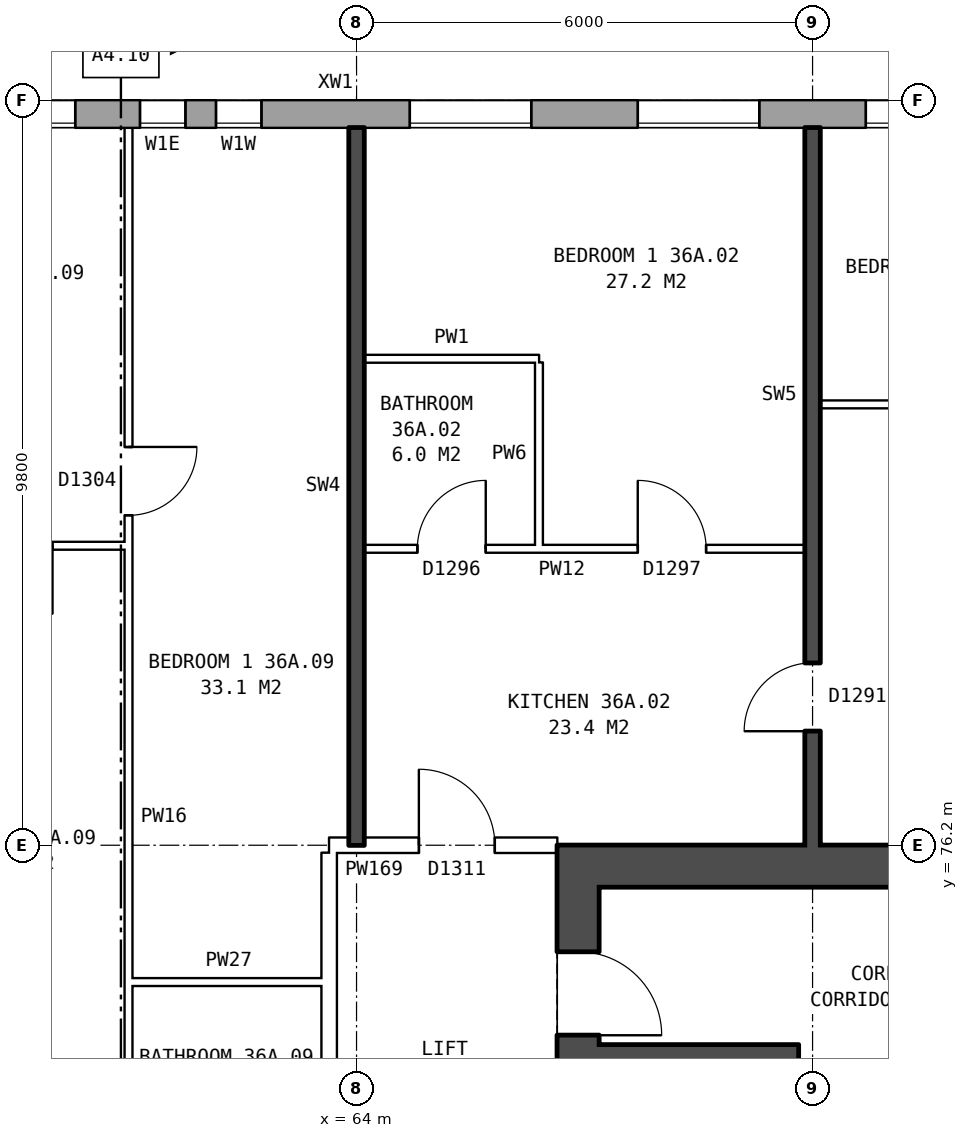
"""IFC4 building model, lengths in metres.
Left out: names, types, materials, properties, quantities, classifications, styles, units other than length and angle.
Written with IfcOpenShell. Run it as: python <this file> out.ifc"""

import sys

from ifc_helpers import new_model, si_unit, direction, frame, frame_2d, origin, place, context, subcontext, project, spatial, rectangle, extrude, element, fill, save


model = new_model("IFC4")
c1 = context("Model", 3, precision=1e-05, world=origin(), true_north=direction((0.0, 1.0)))
c2 = subcontext(c1, "Body", "Model", "MODEL_VIEW")
j1 = project(units=[si_unit("LENGTHUNIT", "METRE"), si_unit("PLANEANGLEUNIT", "RADIAN")], contexts=[c1])
p1 = place(None, origin())
s1 = spatial("IfcSite", under=j1, at=p1, CompositionType="ELEMENT")
p2 = place(p1, origin())
s2 = spatial("IfcBuilding", under=s1, at=p2, CompositionType="ELEMENT")
p3 = place(p2, frame((0.0, 0.0, 129.9)))
s3 = spatial("IfcBuildingStorey", under=s2, at=p3, CompositionType="ELEMENT", Elevation=129.9)
p4 = place(p3, frame((72.925, 85.82, 0.0), z_axis=(0.0, 0.0, 1.0), x_axis=(-1.0, 0.0, 0.0)))
e1 = element("IfcWall", 1, at=p4, inside=s3, PredefinedType="STANDARD", context=c2, shape_type="SweptSolid", body=[
    extrude(rectangle(XDim=43.101, YDim=0.36, at=frame_2d((21.55, 0.0))), origin(), (0.0, 0.0, 1.0), 2.85),
])
p5 = place(p4, frame((0.625, 0.0, 0.8)))
e2 = element("IfcOpeningElement", 2, at=p5, cuts=e1, PredefinedType="OPENING", context=c2, shape_type="SweptSolid", body=[
    extrude(rectangle(XDim=1.6, YDim=1.8, at=frame_2d((0.8, 0.9))), frame((0.0, 0.19, 0.0), z_axis=(0.0, -1.0, 0.0), x_axis=(1.0, 0.0, 0.0)), (0.0, 0.0, 1.0), 0.38),
])
p6 = place(p4, frame((3.625, 0.0, 0.8)))
e3 = element("IfcOpeningElement", 3, at=p6, cuts=e1, PredefinedType="OPENING", context=c2, shape_type="SweptSolid", body=[
    extrude(rectangle(XDim=1.6, YDim=1.8, at=frame_2d((0.8, 0.9))), frame((0.0, 0.19, 0.0), z_axis=(0.0, -1.0, 0.0), x_axis=(1.0, 0.0, 0.0)), (0.0, 0.0, 1.0), 0.38),
])
p7 = place(p4, frame((6.625, 0.0, 0.8)))
e4 = element("IfcOpeningElement", 4, at=p7, cuts=e1, PredefinedType="OPENING", context=c2, shape_type="SweptSolid", body=[
    extrude(rectangle(XDim=1.6, YDim=1.8, at=frame_2d((0.8, 0.9))), frame((0.0, 0.19, 0.0), z_axis=(0.0, -1.0, 0.0), x_axis=(1.0, 0.0, 0.0)), (0.0, 0.0, 1.0), 0.38),
])
p8 = place(p4, frame((10.175, 0.0, 0.15)))
e5 = element("IfcOpeningElement", 5, at=p8, cuts=e1, PredefinedType="OPENING", context=c2, shape_type="SweptSolid", body=[
    extrude(rectangle(XDim=0.6, YDim=0.9, at=frame_2d((0.3, 0.45))), frame((0.0, 0.19, 0.0), z_axis=(0.0, -1.0, 0.0), x_axis=(1.0, 0.0, 0.0)), (0.0, 0.0, 1.0), 0.38),
])
p9 = place(p4, frame((12.625, 0.0, 0.8)))
e6 = element("IfcOpeningElement", 6, at=p9, cuts=e1, PredefinedType="OPENING", context=c2, shape_type="SweptSolid", body=[
    extrude(rectangle(XDim=1.6, YDim=1.8, at=frame_2d((0.8, 0.9))), frame((0.0, 0.19, 0.0), z_axis=(0.0, -1.0, 0.0), x_axis=(1.0, 0.0, 0.0)), (0.0, 0.0, 1.0), 0.38),
])
p10 = place(p4, frame((15.625, 0.0, 0.8)))
e7 = element("IfcOpeningElement", 7, at=p10, cuts=e1, PredefinedType="OPENING", context=c2, shape_type="SweptSolid", body=[
    extrude(rectangle(XDim=1.6, YDim=1.8, at=frame_2d((0.8, 0.9))), frame((0.0, 0.19, 0.0), z_axis=(0.0, -1.0, 0.0), x_axis=(1.0, 0.0, 0.0)), (0.0, 0.0, 1.0), 0.38),
])
p11 = place(p4, frame((18.625, 0.0, 0.8)))
e8 = element("IfcOpeningElement", 8, at=p11, cuts=e1, PredefinedType="OPENING", context=c2, shape_type="SweptSolid", body=[
    extrude(rectangle(XDim=1.6, YDim=1.8, at=frame_2d((0.8, 0.9))), frame((0.0, 0.19, 0.0), z_axis=(0.0, -1.0, 0.0), x_axis=(1.0, 0.0, 0.0)), (0.0, 0.0, 1.0), 0.38),
])
p12 = place(p4, frame((21.625, 0.0, 0.8)))
e9 = element("IfcOpeningElement", 9, at=p12, cuts=e1, PredefinedType="OPENING", context=c2, shape_type="SweptSolid", body=[
    extrude(rectangle(XDim=1.6, YDim=1.8, at=frame_2d((0.8, 0.9))), frame((0.0, 0.19, 0.0), z_axis=(0.0, -1.0, 0.0), x_axis=(1.0, 0.0, 0.0)), (0.0, 0.0, 1.0), 0.38),
])
p13 = place(p4, frame((24.625, 0.0, 0.8)))
e10 = element("IfcOpeningElement", 10, at=p13, cuts=e1, PredefinedType="OPENING", context=c2, shape_type="SweptSolid", body=[
    extrude(rectangle(XDim=1.6, YDim=1.8, at=frame_2d((0.8, 0.9))), frame((0.0, 0.19, 0.0), z_axis=(0.0, -1.0, 0.0), x_axis=(1.0, 0.0, 0.0)), (0.0, 0.0, 1.0), 0.38),
])
p14 = place(p4, frame((27.625, 0.0, 0.8)))
e11 = element("IfcOpeningElement", 11, at=p14, cuts=e1, PredefinedType="OPENING", context=c2, shape_type="SweptSolid", body=[
    extrude(rectangle(XDim=1.6, YDim=1.8, at=frame_2d((0.8, 0.9))), frame((0.0, 0.19, 0.0), z_axis=(0.0, -1.0, 0.0), x_axis=(1.0, 0.0, 0.0)), (0.0, 0.0, 1.0), 0.38),
])
p15 = place(p4, frame((29.525, 0.0, 0.8)))
e12 = element("IfcOpeningElement", 12, at=p15, cuts=e1, PredefinedType="OPENING", context=c2, shape_type="SweptSolid", body=[
    extrude(rectangle(XDim=1.6, YDim=1.8, at=frame_2d((0.8, 0.9))), frame((0.0, 0.19, 0.0), z_axis=(0.0, -1.0, 0.0), x_axis=(1.0, 0.0, 0.0)), (0.0, 0.0, 1.0), 0.38),
])
p16 = place(p4, frame((33.375, 0.0, 1.7)))
e13 = element("IfcOpeningElement", 13, at=p16, cuts=e1, PredefinedType="OPENING", context=c2, shape_type="SweptSolid", body=[
    extrude(rectangle(XDim=0.8, YDim=0.9, at=frame_2d((0.4, 0.45))), frame((0.0, 0.19, 0.0), z_axis=(0.0, -1.0, 0.0), x_axis=(1.0, 0.0, 0.0)), (0.0, 0.0, 1.0), 0.38),
])
p17 = place(p4, frame((36.625, 0.0, 0.8)))
e14 = element("IfcOpeningElement", 14, at=p17, cuts=e1, PredefinedType="OPENING", context=c2, shape_type="SweptSolid", body=[
    extrude(rectangle(XDim=1.6, YDim=1.8, at=frame_2d((0.8, 0.9))), frame((0.0, 0.19, 0.0), z_axis=(0.0, -1.0, 0.0), x_axis=(1.0, 0.0, 0.0)), (0.0, 0.0, 1.0), 0.38),
])
p18 = place(p4, frame((39.625, 0.0, 0.8)))
e15 = element("IfcOpeningElement", 15, at=p18, cuts=e1, PredefinedType="OPENING", context=c2, shape_type="SweptSolid", body=[
    extrude(rectangle(XDim=1.6, YDim=1.8, at=frame_2d((0.8, 0.9))), frame((0.0, 0.19, 0.0), z_axis=(0.0, -1.0, 0.0), x_axis=(1.0, 0.0, 0.0)), (0.0, 0.0, 1.0), 0.38),
])
p19 = place(p4, frame((11.175, 0.0, 0.15)))
e16 = element("IfcOpeningElement", 16, at=p19, cuts=e1, PredefinedType="OPENING", context=c2, shape_type="SweptSolid", body=[
    extrude(rectangle(XDim=0.6, YDim=1.8, at=frame_2d((0.3, 0.9))), frame((0.0, 0.19, 0.0), z_axis=(0.0, -1.0, 0.0), x_axis=(1.0, 0.0, 0.0)), (0.0, 0.0, 1.0), 0.38),
])
p20 = place(p4, frame((31.425, 0.0, 0.8)))
e17 = element("IfcOpeningElement", 17, at=p20, cuts=e1, PredefinedType="OPENING", context=c2, shape_type="SweptSolid", body=[
    extrude(rectangle(XDim=0.8, YDim=0.9, at=frame_2d((0.4, 0.45))), frame((0.0, 0.19, 0.0), z_axis=(0.0, -1.0, 0.0), x_axis=(1.0, 0.0, 0.0)), (0.0, 0.0, 1.0), 0.38),
])
p21 = place(p4, frame((34.475, 0.0, 0.8)))
e18 = element("IfcOpeningElement", 18, at=p21, cuts=e1, PredefinedType="OPENING", context=c2, shape_type="SweptSolid", body=[
    extrude(rectangle(XDim=1.6, YDim=1.8, at=frame_2d((0.8, 0.9))), frame((0.0, 0.19, 0.0), z_axis=(0.0, -1.0, 0.0), x_axis=(1.0, 0.0, 0.0)), (0.0, 0.0, 1.0), 0.38),
])
p22 = place(p3, frame((66.915, 63.8, 0.0), z_axis=(0.0, 0.0, 1.0), x_axis=(0.0, 1.0, 0.0)))
e19 = element("IfcWall", 19, at=p22, inside=s3, PredefinedType="SHEAR", context=c2, shape_type="SweptSolid", body=[
    extrude(rectangle(XDim=12.4, YDim=0.55, at=frame_2d((6.2, 0.0))), origin(), (0.0, 0.0, 1.0), 2.85),
])
p23 = place(p22, frame((1.325, 0.0, 0.0)))
e20 = element("IfcOpeningElement", 20, at=p23, cuts=e19, PredefinedType="OPENING", context=c2, shape_type="SweptSolid", body=[
    extrude(rectangle(XDim=1.1, YDim=2.1, at=frame_2d((0.55, 1.05))), frame((0.0, 0.285, 0.0), z_axis=(0.0, -1.0, 0.0), x_axis=(1.0, 0.0, 0.0)), (0.0, 0.0, 1.0), 0.57),
])
p24 = place(p22, frame((3.6, 0.0, 0.0)))
e21 = element("IfcOpeningElement", 21, at=p24, cuts=e19, PredefinedType="OPENING", context=c2, shape_type="SweptSolid", body=[
    extrude(rectangle(XDim=1.1, YDim=2.1, at=frame_2d((0.55, 1.05))), frame((0.0, 0.285, 0.0), z_axis=(0.0, -1.0, 0.0), x_axis=(1.0, 0.0, 0.0)), (0.0, 0.0, 1.0), 0.57),
])
p25 = place(p22, frame((5.8, 0.0, 0.0)))
e22 = element("IfcOpeningElement", 22, at=p25, cuts=e19, PredefinedType="OPENING", context=c2, shape_type="SweptSolid", body=[
    extrude(rectangle(XDim=1.1, YDim=2.1, at=frame_2d((0.55, 1.05))), frame((0.0, 0.285, 0.0), z_axis=(0.0, -1.0, 0.0), x_axis=(1.0, 0.0, 0.0)), (0.0, 0.0, 1.0), 0.57),
])
p26 = place(p22, frame((8.0, 0.0, 0.0)))
e23 = element("IfcOpeningElement", 23, at=p26, cuts=e19, PredefinedType="OPENING", context=c2, shape_type="SweptSolid", body=[
    extrude(rectangle(XDim=1.1, YDim=2.1, at=frame_2d((0.55, 1.05))), frame((0.0, 0.285, 0.0), z_axis=(0.0, -1.0, 0.0), x_axis=(1.0, 0.0, 0.0)), (0.0, 0.0, 1.0), 0.57),
])
p27 = place(p22, frame((9.9, 0.0, 0.0)))
e24 = element("IfcOpeningElement", 24, at=p27, cuts=e19, PredefinedType="OPENING", context=c2, shape_type="SweptSolid", body=[
    extrude(rectangle(XDim=1.1, YDim=2.1, at=frame_2d((0.55, 1.05))), frame((0.0, 0.285, 0.0), z_axis=(0.0, -1.0, 0.0), x_axis=(1.0, 0.0, 0.0)), (0.0, 0.0, 1.0), 0.57),
])
p28 = place(p3, frame((67.19, 75.925, 0.0), z_axis=(0.0, 0.0, 1.0), x_axis=(1.0, 0.0, 0.0)))
e25 = element("IfcWall", 25, at=p28, inside=s3, PredefinedType="SHEAR", context=c2, shape_type="SweptSolid", body=[
    extrude(rectangle(XDim=7.9, YDim=0.55, at=frame_2d((3.95, 0.0))), origin(), (0.0, 0.0, 1.0), 2.85),
])
p29 = place(p3, frame((67.19, 73.45, 0.0), z_axis=(0.0, 0.0, 1.0), x_axis=(1.0, 0.0, 0.0)))
e26 = element("IfcWall", 26, at=p29, inside=s3, PredefinedType="SHEAR", context=c2, shape_type="SweptSolid", body=[
    extrude(rectangle(XDim=2.375, YDim=0.25, at=frame_2d((1.188, 0.0))), origin(), (0.0, 0.0, 1.0), 2.85),
])
p30 = place(p3, frame((69.69, 66.975, 0.0), z_axis=(0.0, 0.0, 1.0), x_axis=(0.0, 1.0, 0.0)))
e27 = element("IfcWall", 27, at=p30, inside=s3, PredefinedType="SHEAR", context=c2, shape_type="SweptSolid", body=[
    extrude(rectangle(XDim=6.6, YDim=0.25, at=frame_2d((3.3, 0.0))), origin(), (0.0, 0.0, 1.0), 2.85),
])
p31 = place(p3, frame((63.64, 63.9, 0.0), z_axis=(0.0, 0.0, 1.0), x_axis=(0.0, 1.0, 0.0)))
e28 = element("IfcWall", 28, at=p31, inside=s3, PredefinedType="PARTITIONING", context=c2, shape_type="SweptSolid", body=[
    extrude(rectangle(XDim=12.2, YDim=0.2, at=frame_2d((6.1, 0.0))), origin(), (0.0, 0.0, 1.0), 2.85),
])
p32 = place(p31, frame((5.1, 0.0, 0.0)))
e29 = element("IfcOpeningElement", 29, at=p32, cuts=e28, PredefinedType="OPENING", context=c2, shape_type="SweptSolid", body=[
    extrude(rectangle(XDim=2.0, YDim=2.1, at=frame_2d((1.0, 1.05))), frame((0.0, 0.11, 0.0), z_axis=(0.0, -1.0, 0.0), x_axis=(1.0, 0.0, 0.0)), (0.0, 0.0, 1.0), 0.22),
])
p33 = place(p3, frame((61.0, 74.4, 0.0), z_axis=(0.0, 0.0, 1.0), x_axis=(1.0, 0.0, 0.0)))
e30 = element("IfcWall", 30, at=p33, inside=s3, PredefinedType="PARTITIONING", context=c2, shape_type="SweptSolid", body=[
    extrude(rectangle(XDim=2.64, YDim=0.1, at=frame_2d((1.32, 0.0))), origin(), (0.0, 0.0, 1.0), 2.85),
])
p34 = place(p3, frame((63.64, 76.2, 0.0), z_axis=(0.0, 0.0, 1.0), x_axis=(1.0, 0.0, 0.0)))
e31 = element("IfcWall", 31, at=p34, inside=s3, PredefinedType="PARTITIONING", context=c2, shape_type="SweptSolid", body=[
    extrude(rectangle(XDim=3.0, YDim=0.2, at=frame_2d((1.5, 0.0))), origin(), (0.0, 0.0, 1.0), 2.85),
])
p35 = place(p34, frame((1.18, 0.0, 0.0)))
e32 = element("IfcOpeningElement", 32, at=p35, cuts=e31, PredefinedType="OPENING", context=c2, shape_type="SweptSolid", body=[
    extrude(rectangle(XDim=1.0, YDim=2.1, at=frame_2d((0.5, 1.05))), frame((0.0, 0.11, 0.0), z_axis=(0.0, -1.0, 0.0), x_axis=(1.0, 0.0, 0.0)), (0.0, 0.0, 1.0), 0.22),
])
p36 = place(p3, frame((64.1, 80.1, 0.0), z_axis=(0.0, 0.0, 1.0), x_axis=(1.0, 0.0, 0.0)))
e33 = element("IfcWall", 33, at=p36, inside=s3, PredefinedType="PARTITIONING", context=c2, shape_type="SweptSolid", body=[
    extrude(rectangle(XDim=5.8, YDim=0.1, at=frame_2d((2.9, 0.0))), origin(), (0.0, 0.0, 1.0), 2.85),
])
p37 = place(p36, frame((3.6, 0.0, 0.0)))
e34 = element("IfcOpeningElement", 34, at=p37, cuts=e33, PredefinedType="OPENING", context=c2, shape_type="SweptSolid", body=[
    extrude(rectangle(XDim=0.9, YDim=2.1, at=frame_2d((0.45, 1.05))), frame((0.0, 0.06, 0.0), z_axis=(0.0, -1.0, 0.0), x_axis=(1.0, 0.0, 0.0)), (0.0, 0.0, 1.0), 0.12),
])
p38 = place(p36, frame((0.7, 0.0, 0.0)))
e35 = element("IfcOpeningElement", 35, at=p38, cuts=e33, PredefinedType="OPENING", context=c2, shape_type="SweptSolid", body=[
    extrude(rectangle(XDim=0.9, YDim=2.1, at=frame_2d((0.45, 1.05))), frame((0.0, 0.06, 0.0), z_axis=(0.0, -1.0, 0.0), x_axis=(1.0, 0.0, 0.0)), (0.0, 0.0, 1.0), 0.12),
])
p39 = place(p3, frame((58.1, 80.14, 0.0), z_axis=(0.0, 0.0, 1.0), x_axis=(1.0, 0.0, 0.0)))
e36 = element("IfcWall", 36, at=p39, inside=s3, PredefinedType="PARTITIONING", context=c2, shape_type="SweptSolid", body=[
    extrude(rectangle(XDim=2.9, YDim=0.1, at=frame_2d((1.45, 0.0))), origin(), (0.0, 0.0, 1.0), 2.85),
])
p40 = place(p39, frame((1.0, 0.0, 0.0)))
e37 = element("IfcOpeningElement", 37, at=p40, cuts=e36, PredefinedType="OPENING", context=c2, shape_type="SweptSolid", body=[
    extrude(rectangle(XDim=0.9, YDim=2.1, at=frame_2d((0.45, 1.05))), frame((0.0, 0.06, 0.0), z_axis=(0.0, -1.0, 0.0), x_axis=(1.0, 0.0, 0.0)), (0.0, 0.0, 1.0), 0.12),
])
p41 = place(p3, frame((70.1, 82.0, 0.0), z_axis=(0.0, 0.0, 1.0), x_axis=(1.0, 0.0, 0.0)))
e38 = element("IfcWall", 38, at=p41, inside=s3, PredefinedType="PARTITIONING", context=c2, shape_type="SweptSolid", body=[
    extrude(rectangle(XDim=5.54, YDim=0.1, at=frame_2d((2.77, 0.0))), origin(), (0.0, 0.0, 1.0), 2.85),
])
p42 = place(p41, frame((2.32, 0.0, 0.0)))
e39 = element("IfcOpeningElement", 39, at=p42, cuts=e38, PredefinedType="OPENING", context=c2, shape_type="SweptSolid", body=[
    extrude(rectangle(XDim=0.9, YDim=2.1, at=frame_2d((0.45, 1.05))), frame((0.0, 0.06, 0.0), z_axis=(0.0, -1.0, 0.0), x_axis=(1.0, 0.0, 0.0)), (0.0, 0.0, 1.0), 0.12),
])
p43 = place(p3, frame((64.1, 82.6, 0.0), z_axis=(0.0, 0.0, 1.0), x_axis=(1.0, 0.0, 0.0)))
e40 = element("IfcWall", 40, at=p43, inside=s3, PredefinedType="PARTITIONING", context=c2, shape_type="SweptSolid", body=[
    extrude(rectangle(XDim=2.3, YDim=0.1, at=frame_2d((1.15, 0.0))), origin(), (0.0, 0.0, 1.0), 2.85),
])
p44 = place(p3, frame((61.0, 71.3, 0.0), z_axis=(0.0, 0.0, 1.0), x_axis=(0.0, 1.0, 0.0)))
e41 = element("IfcWall", 41, at=p44, inside=s3, PredefinedType="PARTITIONING", context=c2, shape_type="SweptSolid", body=[
    extrude(rectangle(XDim=14.34, YDim=0.1, at=frame_2d((7.17, 0.0))), origin(), (0.0, 0.0, 1.0), 2.85),
])
p45 = place(p44, frame((9.24, 0.0, 0.0)))
e42 = element("IfcOpeningElement", 42, at=p45, cuts=e41, PredefinedType="OPENING", context=c2, shape_type="SweptSolid", body=[
    extrude(rectangle(XDim=0.9, YDim=2.1, at=frame_2d((0.45, 1.05))), frame((0.0, 0.06, 0.0), z_axis=(0.0, -1.0, 0.0), x_axis=(1.0, 0.0, 0.0)), (0.0, 0.0, 1.0), 0.12),
])
p46 = place(p44, frame((0.4, 0.0, 0.0)))
e43 = element("IfcOpeningElement", 43, at=p46, cuts=e41, PredefinedType="OPENING", context=c2, shape_type="SweptSolid", body=[
    extrude(rectangle(XDim=0.9, YDim=2.1, at=frame_2d((0.45, 1.05))), frame((0.0, 0.06, 0.0), z_axis=(0.0, -1.0, 0.0), x_axis=(1.0, 0.0, 0.0)), (0.0, 0.0, 1.0), 0.12),
])
p47 = place(p3, frame((64.0, 76.2, 0.0), z_axis=(0.0, 0.0, 1.0), x_axis=(0.0, 1.0, 0.0)))
e44 = element("IfcWall", 44, at=p47, inside=s3, PredefinedType="SOLIDWALL", context=c2, shape_type="SweptSolid", body=[
    extrude(rectangle(XDim=9.44, YDim=0.2, at=frame_2d((4.72, 0.0))), origin(), (0.0, 0.0, 1.0), 2.85),
])
p48 = place(p3, frame((66.4, 80.15, 0.0), z_axis=(0.0, 0.0, 1.0), x_axis=(0.0, 1.0, 0.0)))
e45 = element("IfcWall", 45, at=p48, inside=s3, PredefinedType="PARTITIONING", context=c2, shape_type="SweptSolid", body=[
    extrude(rectangle(XDim=2.4, YDim=0.1, at=frame_2d((1.2, 0.0))), origin(), (0.0, 0.0, 1.0), 2.85),
])
p49 = place(p3, frame((70.0, 76.2, 0.0), z_axis=(0.0, 0.0, 1.0), x_axis=(0.0, 1.0, 0.0)))
e46 = element("IfcWall", 46, at=p49, inside=s3, PredefinedType="SOLIDWALL", context=c2, shape_type="SweptSolid", body=[
    extrude(rectangle(XDim=9.44, YDim=0.2, at=frame_2d((4.72, 0.0))), origin(), (0.0, 0.0, 1.0), 2.85),
])
p50 = place(p49, frame((1.5, 0.0, 0.0)))
e47 = element("IfcOpeningElement", 47, at=p50, cuts=e46, PredefinedType="OPENING", context=c2, shape_type="SweptSolid", body=[
    extrude(rectangle(XDim=0.9, YDim=2.1, at=frame_2d((0.45, 1.05))), frame((0.0, 0.11, 0.0), z_axis=(0.0, -1.0, 0.0), x_axis=(1.0, 0.0, 0.0)), (0.0, 0.0, 1.0), 0.22),
])
p51 = place(p5, origin())
e48 = element("IfcWindow", 48, at=p51, inside=s3, PartitioningType="SINGLE_PANEL", PredefinedType="WINDOW", context=c2, shape_type="SweptSolid", body=[
    extrude(rectangle(XDim=1.6, YDim=1.8, at=frame_2d((0.8, 0.9))), frame((0.0, 0.15, 0.0), z_axis=(0.0, -1.0, 0.0), x_axis=(1.0, 0.0, 0.0)), (0.0, 0.0, 1.0), 0.06),
])
fill(e2, e48)
p52 = place(p6, origin())
e49 = element("IfcWindow", 49, at=p52, inside=s3, PartitioningType="SINGLE_PANEL", PredefinedType="WINDOW", context=c2, shape_type="SweptSolid", body=[
    extrude(rectangle(XDim=1.6, YDim=1.8, at=frame_2d((0.8, 0.9))), frame((0.0, 0.15, 0.0), z_axis=(0.0, -1.0, 0.0), x_axis=(1.0, 0.0, 0.0)), (0.0, 0.0, 1.0), 0.06),
])
fill(e3, e49)
p53 = place(p7, origin())
e50 = element("IfcWindow", 50, at=p53, inside=s3, PartitioningType="SINGLE_PANEL", PredefinedType="WINDOW", context=c2, shape_type="SweptSolid", body=[
    extrude(rectangle(XDim=1.6, YDim=1.8, at=frame_2d((0.8, 0.9))), frame((0.0, 0.15, 0.0), z_axis=(0.0, -1.0, 0.0), x_axis=(1.0, 0.0, 0.0)), (0.0, 0.0, 1.0), 0.06),
])
fill(e4, e50)
p54 = place(p8, origin())
e51 = element("IfcWindow", 51, at=p54, inside=s3, PartitioningType="SINGLE_PANEL", PredefinedType="WINDOW", context=c2, shape_type="SweptSolid", body=[
    extrude(rectangle(XDim=0.6, YDim=0.9, at=frame_2d((0.3, 0.45))), frame((0.0, 0.15, 0.0), z_axis=(0.0, -1.0, 0.0), x_axis=(1.0, 0.0, 0.0)), (0.0, 0.0, 1.0), 0.06),
])
fill(e5, e51)
p55 = place(p9, origin())
e52 = element("IfcWindow", 52, at=p55, inside=s3, PartitioningType="SINGLE_PANEL", PredefinedType="WINDOW", context=c2, shape_type="SweptSolid", body=[
    extrude(rectangle(XDim=1.6, YDim=1.8, at=frame_2d((0.8, 0.9))), frame((0.0, 0.15, 0.0), z_axis=(0.0, -1.0, 0.0), x_axis=(1.0, 0.0, 0.0)), (0.0, 0.0, 1.0), 0.06),
])
fill(e6, e52)
p56 = place(p27, frame((1.1, 0.0, 0.0), z_axis=(0.0, 0.0, 1.0), x_axis=(-1.0, 0.0, 0.0)))
e53 = element("IfcDoor", 53, at=p56, inside=s3, OperationType="SINGLE_SWING_RIGHT", PredefinedType="DOOR", context=c2, shape_type="SweptSolid", body=[
    extrude(rectangle(XDim=1.1, YDim=2.1, at=frame_2d((0.55, 1.05))), frame((0.0, 0.26, 0.0), z_axis=(0.0, -1.0, 0.0), x_axis=(1.0, 0.0, 0.0)), (0.0, 0.0, 1.0), 0.05),
])
fill(e24, e53)
p57 = place(p37, origin())
e54 = element("IfcDoor", 54, at=p57, inside=s3, OperationType="SINGLE_SWING_LEFT", PredefinedType="DOOR", context=c2, shape_type="SweptSolid", body=[
    extrude(rectangle(XDim=0.9, YDim=2.1, at=frame_2d((0.45, 1.05))), frame((0.0, 0.025, 0.0), z_axis=(0.0, -1.0, 0.0), x_axis=(1.0, 0.0, 0.0)), (0.0, 0.0, 1.0), 0.05),
])
fill(e34, e54)
p58 = place(p35, origin())
e55 = element("IfcDoor", 55, at=p58, inside=s3, OperationType="SINGLE_SWING_LEFT", PredefinedType="DOOR", context=c2, shape_type="SweptSolid", body=[
    extrude(rectangle(XDim=1.0, YDim=2.1, at=frame_2d((0.5, 1.05))), frame((0.0, 0.025, 0.0), z_axis=(0.0, -1.0, 0.0), x_axis=(1.0, 0.0, 0.0)), (0.0, 0.0, 1.0), 0.05),
])
fill(e32, e55)
p59 = place(p50, origin())
e56 = element("IfcDoor", 56, at=p59, inside=s3, OperationType="SINGLE_SWING_LEFT", PredefinedType="DOOR", context=c2, shape_type="SweptSolid", body=[
    extrude(rectangle(XDim=0.9, YDim=2.1, at=frame_2d((0.45, 1.05))), frame((0.0, 0.025, 0.0), z_axis=(0.0, -1.0, 0.0), x_axis=(1.0, 0.0, 0.0)), (0.0, 0.0, 1.0), 0.05),
])
fill(e47, e56)
p60 = place(p38, origin())
e57 = element("IfcDoor", 57, at=p60, inside=s3, OperationType="SINGLE_SWING_RIGHT", PredefinedType="DOOR", context=c2, shape_type="SweptSolid", body=[
    extrude(rectangle(XDim=0.9, YDim=2.1, at=frame_2d((0.45, 1.05))), frame((0.0, 0.025, 0.0), z_axis=(0.0, -1.0, 0.0), x_axis=(1.0, 0.0, 0.0)), (0.0, 0.0, 1.0), 0.05),
])
fill(e35, e57)
p61 = place(p45, frame((0.9, 0.0, 0.0), z_axis=(0.0, 0.0, 1.0), x_axis=(-1.0, 0.0, 0.0)))
e58 = element("IfcDoor", 58, at=p61, inside=s3, OperationType="SINGLE_SWING_LEFT", PredefinedType="DOOR", context=c2, shape_type="SweptSolid", body=[
    extrude(rectangle(XDim=0.9, YDim=2.1, at=frame_2d((0.45, 1.05))), frame((0.0, 0.025, 0.0), z_axis=(0.0, -1.0, 0.0), x_axis=(1.0, 0.0, 0.0)), (0.0, 0.0, 1.0), 0.05),
])
fill(e42, e58)
p62 = place(p19, origin())
e59 = element("IfcWindow", 59, at=p62, inside=s3, PartitioningType="SINGLE_PANEL", PredefinedType="WINDOW", context=c2, shape_type="SweptSolid", body=[
    extrude(rectangle(XDim=0.6, YDim=1.8, at=frame_2d((0.3, 0.9))), frame((0.0, 0.15, 0.0), z_axis=(0.0, -1.0, 0.0), x_axis=(1.0, 0.0, 0.0)), (0.0, 0.0, 1.0), 0.06),
])
fill(e16, e59)
save(model, sys.argv[1])
